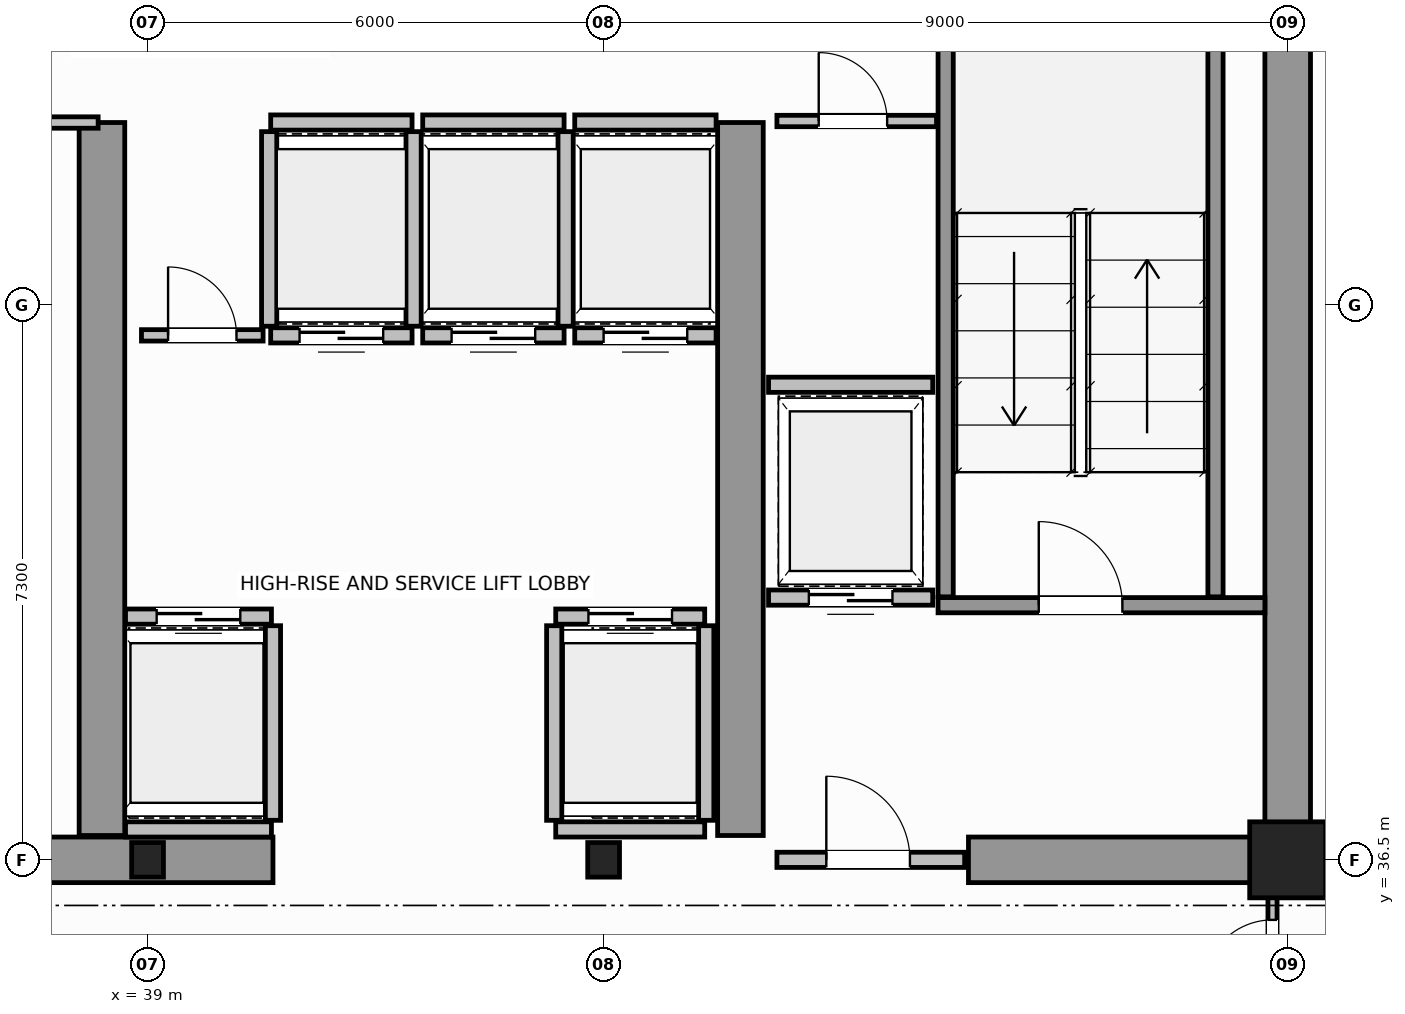
"""IFC4 building model, lengths in metres.
Left out: names, types, materials, properties, quantities, classifications, styles, units other than length and angle.
Written with IfcOpenShell. Run it as: python <this file> out.ifc"""

import sys

from ifc_helpers import new_model, si_unit, direction, frame, frame_2d, origin, origin_2d, place, context, subcontext, project, spatial, rectangle, i_section, extrude, source, transform, mapped, element, fill, save


model = new_model("IFC4")
c1 = context("Model", 3, precision=1e-05, world=origin(), true_north=direction((0.0, 1.0)))
c2 = subcontext(c1, "Body", "Model", "MODEL_VIEW")
j1 = project(units=[si_unit("LENGTHUNIT", "METRE"), si_unit("PLANEANGLEUNIT", "RADIAN")], contexts=[c1])
p1 = place(None, origin())
s1 = spatial("IfcSite", under=j1, at=p1, CompositionType="ELEMENT")
p2 = place(p1, origin())
s2 = spatial("IfcBuilding", under=s1, at=p2, CompositionType="ELEMENT")
p3 = place(p2, frame((0.0, 0.0, 210.8)))
s3 = spatial("IfcBuildingStorey", under=s2, at=p3, CompositionType="ELEMENT", Elevation=210.8)
m1 = source(origin(), c2, "Body", "SweptSolid", [
    extrude(i_section(OverallWidth=0.418, OverallDepth=0.455, WebThickness=0.042, FlangeThickness=0.058, FilletRadius=0.015, at=origin_2d()), origin(), (0.0, 0.0, 1.0), 3.8),
])
for number, where, z_axis, x_axis in (
    (1, (39.0, 36.5, 0.0), (0.0, 0.0, 1.0), (1.0, 0.0, 0.0)),
    (2, (45.0, 36.5, 0.0), (0.0, 0.0, 1.0), (1.0, 0.0, 0.0)),
):
    element("IfcColumn", number, at=place(p3, frame(where, z_axis=z_axis, x_axis=x_axis)), inside=s3, PredefinedType="COLUMN", context=c2, shape_type="MappedRepresentation", body=[
        mapped(m1, transform((0.0, 0.0, 0.0), scale=1.0)),
    ])
m2 = source(origin(), c2, "Body", "SweptSolid", [
    extrude(rectangle(XDim=1.0, YDim=1.0, at=origin_2d()), origin(), (0.0, 0.0, 1.0), 3.8),
])
p4 = place(p3, frame((54.0, 36.5, 0.0), z_axis=(0.0, 0.0, 1.0), x_axis=(1.0, 0.0, 0.0)))
e3 = element("IfcColumn", 3, at=p4, inside=s3, PredefinedType="COLUMN", context=c2, shape_type="MappedRepresentation", body=[
    mapped(m2, transform((0.0, 0.0, 0.0), scale=1.0)),
])
p5 = place(p3, frame((54.0, 36.5, 0.0), z_axis=(0.0, 0.0, 1.0), x_axis=(0.0, 1.0, 0.0)))
e4 = element("IfcWall", 4, at=p5, inside=s3, PredefinedType="SHEAR", context=c2, shape_type="SweptSolid", body=[
    extrude(rectangle(XDim=14.5, YDim=0.6, at=frame_2d((7.25, 0.0))), origin(), (0.0, 0.0, 1.0), 3.8),
])
p6 = place(p3, frame((36.15, 36.5, 0.0), z_axis=(0.0, 0.0, 1.0), x_axis=(1.0, 0.0, 0.0)))
e5 = element("IfcWall", 5, at=p6, inside=s3, PredefinedType="SHEAR", context=c2, shape_type="SweptSolid", body=[
    extrude(rectangle(XDim=4.5, YDim=0.6, at=frame_2d((2.25, 0.0))), origin(), (0.0, 0.0, 1.0), 3.8),
])
p7 = place(p3, frame((49.8, 36.5, 0.0), z_axis=(0.0, 0.0, 1.0), x_axis=(1.0, 0.0, 0.0)))
e6 = element("IfcWall", 6, at=p7, inside=s3, PredefinedType="SHEAR", context=c2, shape_type="SweptSolid", body=[
    extrude(rectangle(XDim=3.88, YDim=0.6, at=frame_2d((1.94, 0.0))), origin(), (0.0, 0.0, 1.0), 2.58),
])
for number, where, z_axis, x_axis in (
    (7, (38.4, 36.82, 0.0), (0.0, 0.0, 1.0), (0.0, 1.0, 0.0)),
    (8, (46.8, 36.82, 0.0), (0.0, 0.0, 1.0), (0.0, 1.0, 0.0)),
):
    element("IfcWall", number, at=place(p3, frame(where, z_axis=z_axis, x_axis=x_axis)), inside=s3, PredefinedType="SHEAR", context=c2, shape_type="SweptSolid", body=[
        extrude(rectangle(XDim=9.38, YDim=0.6, at=frame_2d((4.69, 0.0))), origin(), (0.0, 0.0, 1.0), 3.8),
    ])
p8 = place(p3, frame((49.4, 39.85, 0.0), z_axis=(0.0, 0.0, 1.0), x_axis=(1.0, 0.0, 0.0)))
e9 = element("IfcWall", 9, at=p8, inside=s3, PredefinedType="SOLIDWALL", context=c2, shape_type="SweptSolid", body=[
    extrude(rectangle(XDim=4.3, YDim=0.2, at=frame_2d((2.15, 0.0))), origin(), (0.0, 0.0, 1.0), 3.8),
])
p9 = place(p8, frame((1.325, 0.0, 0.0)))
e10 = element("IfcOpeningElement", 10, at=p9, cuts=e9, PredefinedType="OPENING", context=c2, shape_type="SweptSolid", body=[
    extrude(rectangle(XDim=1.1, YDim=2.15, at=frame_2d((0.55, 1.075))), frame((0.0, 0.11, 0.0), z_axis=(0.0, -1.0, 0.0), x_axis=(1.0, 0.0, 0.0)), (0.0, 0.0, 1.0), 0.22),
])
for number, where, z_axis, x_axis in (
    (11, (49.5, 39.96, 0.0), (0.0, 0.0, 1.0), (0.0, 1.0, 0.0)),
    (12, (53.05, 39.96, 0.0), (0.0, 0.0, 1.0), (0.0, 1.0, 0.0)),
):
    element("IfcWall", number, at=place(p3, frame(where, z_axis=z_axis, x_axis=x_axis)), inside=s3, PredefinedType="SOLIDWALL", context=c2, shape_type="SweptSolid", body=[
        extrude(rectangle(XDim=9.93, YDim=0.2, at=frame_2d((4.965, 0.0))), origin(), (0.0, 0.0, 1.0), 3.8),
    ])
p10 = place(p3, frame((47.28, 36.5, 0.0), z_axis=(0.0, 0.0, 1.0), x_axis=(1.0, 0.0, 0.0)))
e13 = element("IfcWall", 13, at=p10, inside=s3, PredefinedType="SOLIDWALL", context=c2, shape_type="SweptSolid", body=[
    extrude(rectangle(XDim=2.47, YDim=0.2, at=frame_2d((1.235, 0.0))), origin(), (0.0, 0.0, 1.0), 2.57),
])
p11 = place(p10, frame((0.65, 0.0, 0.0)))
e14 = element("IfcOpeningElement", 14, at=p11, cuts=e13, PredefinedType="OPENING", context=c2, shape_type="SweptSolid", body=[
    extrude(rectangle(XDim=1.1, YDim=2.15, at=frame_2d((0.55, 1.075))), frame((0.0, 0.11, 0.0), z_axis=(0.0, -1.0, 0.0), x_axis=(1.0, 0.0, 0.0)), (0.0, 0.0, 1.0), 0.22),
])
p12 = place(p3, frame((38.71, 39.7, 0.0), z_axis=(0.0, 0.0, 1.0), x_axis=(1.0, 0.0, 0.0)))
e15 = element("IfcWall", 15, at=p12, inside=s3, PredefinedType="SOLIDWALL", context=c2, shape_type="SweptSolid", body=[
    extrude(rectangle(XDim=1.92, YDim=0.2, at=frame_2d((0.96, 0.0))), origin(), (0.0, 0.0, 1.0), 3.58),
])
p13 = place(p12, frame((0.41, 0.0, 0.0)))
e16 = element("IfcOpeningElement", 16, at=p13, cuts=e15, PredefinedType="OPENING", context=c2, shape_type="SweptSolid", body=[
    extrude(rectangle(XDim=1.1, YDim=2.15, at=frame_2d((0.55, 1.075))), frame((0.0, 0.11, 0.0), z_axis=(0.0, -1.0, 0.0), x_axis=(1.0, 0.0, 0.0)), (0.0, 0.0, 1.0), 0.22),
])
p14 = place(p3, frame((38.71, 36.9, 0.0), z_axis=(0.0, 0.0, 1.0), x_axis=(1.0, 0.0, 0.0)))
e17 = element("IfcWall", 17, at=p14, inside=s3, PredefinedType="SOLIDWALL", context=c2, shape_type="SweptSolid", body=[
    extrude(rectangle(XDim=1.92, YDim=0.2, at=frame_2d((0.96, 0.0))), origin(), (0.0, 0.0, 1.0), 3.58),
])
p15 = place(p3, frame((40.65, 37.02, 0.0), z_axis=(0.0, 0.0, 1.0), x_axis=(0.0, 1.0, 0.0)))
e18 = element("IfcWall", 18, at=p15, inside=s3, PredefinedType="SOLIDWALL", context=c2, shape_type="SweptSolid", body=[
    extrude(rectangle(XDim=2.56, YDim=0.2, at=frame_2d((1.28, 0.0))), origin(), (0.0, 0.0, 1.0), 3.58),
])
p16 = place(p3, frame((44.37, 39.7, 0.0), z_axis=(0.0, 0.0, 1.0), x_axis=(1.0, 0.0, 0.0)))
e19 = element("IfcWall", 19, at=p16, inside=s3, PredefinedType="SOLIDWALL", context=c2, shape_type="SweptSolid", body=[
    extrude(rectangle(XDim=1.96, YDim=0.2, at=frame_2d((0.98, 0.0))), origin(), (0.0, 0.0, 1.0), 3.58),
])
p17 = place(p16, frame((0.43, 0.0, 0.0)))
e20 = element("IfcOpeningElement", 20, at=p17, cuts=e19, PredefinedType="OPENING", context=c2, shape_type="SweptSolid", body=[
    extrude(rectangle(XDim=1.1, YDim=2.15, at=frame_2d((0.55, 1.075))), frame((0.0, 0.11, 0.0), z_axis=(0.0, -1.0, 0.0), x_axis=(1.0, 0.0, 0.0)), (0.0, 0.0, 1.0), 0.22),
])
p18 = place(p3, frame((44.37, 36.9, 0.0), z_axis=(0.0, 0.0, 1.0), x_axis=(1.0, 0.0, 0.0)))
e21 = element("IfcWall", 21, at=p18, inside=s3, PredefinedType="SOLIDWALL", context=c2, shape_type="SweptSolid", body=[
    extrude(rectangle(XDim=1.96, YDim=0.2, at=frame_2d((0.98, 0.0))), origin(), (0.0, 0.0, 1.0), 2.57),
])
for number, where, z_axis, x_axis in (
    (22, (44.35, 37.02, 0.0), (0.0, 0.0, 1.0), (0.0, 1.0, 0.0)),
    (23, (46.35, 37.02, 0.0), (0.0, 0.0, 1.0), (0.0, 1.0, 0.0)),
):
    element("IfcWall", number, at=place(p3, frame(where, z_axis=z_axis, x_axis=x_axis)), inside=s3, PredefinedType="SOLIDWALL", context=c2, shape_type="SweptSolid", body=[
        extrude(rectangle(XDim=2.56, YDim=0.2, at=frame_2d((1.28, 0.0))), origin(), (0.0, 0.0, 1.0), 3.58),
    ])
p19 = place(p3, frame((40.62, 43.4, 0.0), z_axis=(0.0, 0.0, 1.0), x_axis=(1.0, 0.0, 0.0)))
e24 = element("IfcWall", 24, at=p19, inside=s3, PredefinedType="SOLIDWALL", context=c2, shape_type="SweptSolid", body=[
    extrude(rectangle(XDim=1.86, YDim=0.2, at=frame_2d((0.93, 0.0))), origin(), (0.0, 0.0, 1.0), 3.58),
])
p20 = place(p19, frame((0.38, 0.0, 0.0)))
e25 = element("IfcOpeningElement", 25, at=p20, cuts=e24, PredefinedType="OPENING", context=c2, shape_type="SweptSolid", body=[
    extrude(rectangle(XDim=1.1, YDim=2.15, at=frame_2d((0.55, 1.075))), frame((0.0, 0.11, 0.0), z_axis=(0.0, -1.0, 0.0), x_axis=(1.0, 0.0, 0.0)), (0.0, 0.0, 1.0), 0.22),
])
p21 = place(p3, frame((40.62, 46.2, 0.0), z_axis=(0.0, 0.0, 1.0), x_axis=(1.0, 0.0, 0.0)))
e26 = element("IfcWall", 26, at=p21, inside=s3, PredefinedType="SOLIDWALL", context=c2, shape_type="SweptSolid", body=[
    extrude(rectangle(XDim=1.86, YDim=0.2, at=frame_2d((0.93, 0.0))), origin(), (0.0, 0.0, 1.0), 3.58),
])
for number, where, z_axis, x_axis in (
    (27, (40.6, 43.52, 0.0), (0.0, 0.0, 1.0), (0.0, 1.0, 0.0)),
    (28, (42.5, 43.52, 0.0), (0.0, 0.0, 1.0), (0.0, 1.0, 0.0)),
):
    element("IfcWall", number, at=place(p3, frame(where, z_axis=z_axis, x_axis=x_axis)), inside=s3, PredefinedType="SOLIDWALL", context=c2, shape_type="SweptSolid", body=[
        extrude(rectangle(XDim=2.56, YDim=0.2, at=frame_2d((1.28, 0.0))), origin(), (0.0, 0.0, 1.0), 3.58),
    ])
p22 = place(p3, frame((42.62, 43.4, 0.0), z_axis=(0.0, 0.0, 1.0), x_axis=(1.0, 0.0, 0.0)))
e29 = element("IfcWall", 29, at=p22, inside=s3, PredefinedType="SOLIDWALL", context=c2, shape_type="SweptSolid", body=[
    extrude(rectangle(XDim=1.86, YDim=0.2, at=frame_2d((0.93, 0.0))), origin(), (0.0, 0.0, 1.0), 3.58),
])
p23 = place(p22, frame((0.38, 0.0, 0.0)))
e30 = element("IfcOpeningElement", 30, at=p23, cuts=e29, PredefinedType="OPENING", context=c2, shape_type="SweptSolid", body=[
    extrude(rectangle(XDim=1.1, YDim=2.15, at=frame_2d((0.55, 1.075))), frame((0.0, 0.11, 0.0), z_axis=(0.0, -1.0, 0.0), x_axis=(1.0, 0.0, 0.0)), (0.0, 0.0, 1.0), 0.22),
])
p24 = place(p3, frame((42.62, 46.2, 0.0), z_axis=(0.0, 0.0, 1.0), x_axis=(1.0, 0.0, 0.0)))
e31 = element("IfcWall", 31, at=p24, inside=s3, PredefinedType="SOLIDWALL", context=c2, shape_type="SweptSolid", body=[
    extrude(rectangle(XDim=1.86, YDim=0.2, at=frame_2d((0.93, 0.0))), origin(), (0.0, 0.0, 1.0), 3.58),
])
p25 = place(p3, frame((44.5, 43.52, 0.0), z_axis=(0.0, 0.0, 1.0), x_axis=(0.0, 1.0, 0.0)))
e32 = element("IfcWall", 32, at=p25, inside=s3, PredefinedType="SOLIDWALL", context=c2, shape_type="SweptSolid", body=[
    extrude(rectangle(XDim=2.56, YDim=0.2, at=frame_2d((1.28, 0.0))), origin(), (0.0, 0.0, 1.0), 3.58),
])
p26 = place(p3, frame((44.62, 43.4, 0.0), z_axis=(0.0, 0.0, 1.0), x_axis=(1.0, 0.0, 0.0)))
e33 = element("IfcWall", 33, at=p26, inside=s3, PredefinedType="SOLIDWALL", context=c2, shape_type="SweptSolid", body=[
    extrude(rectangle(XDim=1.86, YDim=0.2, at=frame_2d((0.93, 0.0))), origin(), (0.0, 0.0, 1.0), 3.58),
])
p27 = place(p26, frame((0.38, 0.0, 0.0)))
e34 = element("IfcOpeningElement", 34, at=p27, cuts=e33, PredefinedType="OPENING", context=c2, shape_type="SweptSolid", body=[
    extrude(rectangle(XDim=1.1, YDim=2.15, at=frame_2d((0.55, 1.075))), frame((0.0, 0.11, 0.0), z_axis=(0.0, -1.0, 0.0), x_axis=(1.0, 0.0, 0.0)), (0.0, 0.0, 1.0), 0.22),
])
p28 = place(p3, frame((44.62, 46.2, 0.0), z_axis=(0.0, 0.0, 1.0), x_axis=(1.0, 0.0, 0.0)))
e35 = element("IfcWall", 35, at=p28, inside=s3, PredefinedType="SOLIDWALL", context=c2, shape_type="SweptSolid", body=[
    extrude(rectangle(XDim=1.86, YDim=0.2, at=frame_2d((0.93, 0.0))), origin(), (0.0, 0.0, 1.0), 3.58),
])
p29 = place(p3, frame((47.17, 39.95, 0.0), z_axis=(0.0, 0.0, 1.0), x_axis=(1.0, 0.0, 0.0)))
e36 = element("IfcWall", 36, at=p29, inside=s3, PredefinedType="SOLIDWALL", context=c2, shape_type="SweptSolid", body=[
    extrude(rectangle(XDim=2.16, YDim=0.2, at=frame_2d((1.08, 0.0))), origin(), (0.0, 0.0, 1.0), 3.58),
])
p30 = place(p29, frame((0.53, 0.0, 0.0)))
e37 = element("IfcOpeningElement", 37, at=p30, cuts=e36, PredefinedType="OPENING", context=c2, shape_type="SweptSolid", body=[
    extrude(rectangle(XDim=1.1, YDim=2.15, at=frame_2d((0.55, 1.075))), frame((0.0, 0.11, 0.0), z_axis=(0.0, -1.0, 0.0), x_axis=(1.0, 0.0, 0.0)), (0.0, 0.0, 1.0), 0.22),
])
p31 = place(p3, frame((47.17, 42.75, 0.0), z_axis=(0.0, 0.0, 1.0), x_axis=(1.0, 0.0, 0.0)))
e38 = element("IfcWall", 38, at=p31, inside=s3, PredefinedType="SOLIDWALL", context=c2, shape_type="SweptSolid", body=[
    extrude(rectangle(XDim=2.16, YDim=0.2, at=frame_2d((1.08, 0.0))), origin(), (0.0, 0.0, 1.0), 3.58),
])
p32 = place(p3, frame((29.85, 46.2, 0.0), z_axis=(0.0, 0.0, 1.0), x_axis=(1.0, 0.0, 0.0)))
e39 = element("IfcWall", 39, at=p32, inside=s3, PredefinedType="PARTITIONING", context=c2, shape_type="SweptSolid", body=[
    extrude(rectangle(XDim=8.5, YDim=0.15, at=frame_2d((4.25, 0.0))), origin(), (0.0, 0.0, 1.0), 3.58),
])
p33 = place(p3, frame((47.28, 46.22, 0.0), z_axis=(0.0, 0.0, 1.0), x_axis=(1.0, 0.0, 0.0)))
e40 = element("IfcWall", 40, at=p33, inside=s3, PredefinedType="PARTITIONING", context=c2, shape_type="SweptSolid", body=[
    extrude(rectangle(XDim=2.1, YDim=0.15, at=frame_2d((1.05, 0.0))), origin(), (0.0, 0.0, 1.0), 3.58),
])
p34 = place(p33, frame((0.55, 0.0, 0.0)))
e41 = element("IfcOpeningElement", 41, at=p34, cuts=e40, PredefinedType="OPENING", context=c2, shape_type="SweptSolid", body=[
    extrude(rectangle(XDim=0.9, YDim=2.1, at=frame_2d((0.45, 1.05))), frame((0.0, 0.085, 0.0), z_axis=(0.0, -1.0, 0.0), x_axis=(1.0, 0.0, 0.0)), (0.0, 0.0, 1.0), 0.17),
])
p35 = place(p3, frame((38.92, 43.4, 0.0), z_axis=(0.0, 0.0, 1.0), x_axis=(1.0, 0.0, 0.0)))
e42 = element("IfcWall", 42, at=p35, inside=s3, PredefinedType="PARTITIONING", context=c2, shape_type="SweptSolid", body=[
    extrude(rectangle(XDim=1.6, YDim=0.15, at=frame_2d((0.8, 0.0))), origin(), (0.0, 0.0, 1.0), 3.58),
])
p36 = place(p35, frame((0.35, 0.0, 0.0)))
e43 = element("IfcOpeningElement", 43, at=p36, cuts=e42, PredefinedType="OPENING", context=c2, shape_type="SweptSolid", body=[
    extrude(rectangle(XDim=0.9, YDim=2.1, at=frame_2d((0.45, 1.05))), frame((0.0, 0.085, 0.0), z_axis=(0.0, -1.0, 0.0), x_axis=(1.0, 0.0, 0.0)), (0.0, 0.0, 1.0), 0.17),
])
p37 = place(p3, frame((53.8, 34.16, 0.0), z_axis=(0.0, 0.0, 1.0), x_axis=(0.0, 1.0, 0.0)))
e44 = element("IfcWall", 44, at=p37, inside=s3, PredefinedType="PARTITIONING", context=c2, shape_type="SweptSolid", body=[
    extrude(rectangle(XDim=2.28, YDim=0.12, at=frame_2d((1.14, 0.0))), origin(), (0.0, 0.0, 1.0), 3.58),
])
p38 = place(p37, frame((0.65, 0.0, 0.0)))
e45 = element("IfcOpeningElement", 45, at=p38, cuts=e44, PredefinedType="OPENING", context=c2, shape_type="SweptSolid", body=[
    extrude(rectangle(XDim=0.9, YDim=2.15, at=frame_2d((0.45, 1.075))), frame((0.0, 0.07, 0.0), z_axis=(0.0, -1.0, 0.0), x_axis=(1.0, 0.0, 0.0)), (0.0, 0.0, 1.0), 0.14),
])
m3 = source(origin(), c2, "Body", "SweptSolid", [
    extrude(rectangle(XDim=1.1, YDim=2.15, at=frame_2d((0.55, 1.075))), frame((0.0, 0.025, 0.0), z_axis=(0.0, -1.0, 0.0), x_axis=(1.0, 0.0, 0.0)), (0.0, 0.0, 1.0), 0.05),
])
p39 = place(p9, origin())
e46 = element("IfcDoor", 46, at=p39, inside=s3, OperationType="SINGLE_SWING_RIGHT", PredefinedType="DOOR", context=c2, shape_type="MappedRepresentation", body=[
    mapped(m3, transform((0.0, 0.0, 0.0), scale=1.0)),
])
fill(e10, e46)
p40 = place(p11, origin())
e47 = element("IfcDoor", 47, at=p40, inside=s3, OperationType="SINGLE_SWING_LEFT", PredefinedType="DOOR", context=c2, shape_type="MappedRepresentation", body=[
    mapped(m3, transform((0.0, 0.0, 0.0), scale=1.0)),
])
fill(e14, e47)
p41 = place(p13, origin())
e48 = element("IfcDoor", 48, at=p41, inside=s3, OperationType="DOUBLE_DOOR_SLIDING", PredefinedType="DOOR", context=c2, shape_type="MappedRepresentation", body=[
    mapped(m3, transform((0.0, 0.0, 0.0), scale=1.0)),
])
fill(e16, e48)
p42 = place(p17, origin())
e49 = element("IfcDoor", 49, at=p42, inside=s3, OperationType="DOUBLE_DOOR_SLIDING", PredefinedType="DOOR", context=c2, shape_type="MappedRepresentation", body=[
    mapped(m3, transform((0.0, 0.0, 0.0), scale=1.0)),
])
fill(e20, e49)
p43 = place(p20, origin())
e50 = element("IfcDoor", 50, at=p43, inside=s3, OperationType="DOUBLE_DOOR_SLIDING", PredefinedType="DOOR", context=c2, shape_type="MappedRepresentation", body=[
    mapped(m3, transform((0.0, 0.0, 0.0), scale=1.0)),
])
fill(e25, e50)
p44 = place(p23, origin())
e51 = element("IfcDoor", 51, at=p44, inside=s3, OperationType="DOUBLE_DOOR_SLIDING", PredefinedType="DOOR", context=c2, shape_type="MappedRepresentation", body=[
    mapped(m3, transform((0.0, 0.0, 0.0), scale=1.0)),
])
fill(e30, e51)
p45 = place(p27, origin())
e52 = element("IfcDoor", 52, at=p45, inside=s3, OperationType="DOUBLE_DOOR_SLIDING", PredefinedType="DOOR", context=c2, shape_type="MappedRepresentation", body=[
    mapped(m3, transform((0.0, 0.0, 0.0), scale=1.0)),
])
fill(e34, e52)
p46 = place(p30, origin())
e53 = element("IfcDoor", 53, at=p46, inside=s3, OperationType="DOUBLE_DOOR_SLIDING", PredefinedType="DOOR", context=c2, shape_type="MappedRepresentation", body=[
    mapped(m3, transform((0.0, 0.0, 0.0), scale=1.0)),
])
fill(e37, e53)
m4 = source(origin(), c2, "Body", "SweptSolid", [
    extrude(rectangle(XDim=0.9, YDim=2.1, at=frame_2d((0.45, 1.05))), frame((0.0, 0.025, 0.0), z_axis=(0.0, -1.0, 0.0), x_axis=(1.0, 0.0, 0.0)), (0.0, 0.0, 1.0), 0.05),
])
p47 = place(p34, origin())
e54 = element("IfcDoor", 54, at=p47, inside=s3, OperationType="SINGLE_SWING_RIGHT", PredefinedType="DOOR", context=c2, shape_type="MappedRepresentation", body=[
    mapped(m4, transform((0.0, 0.0, 0.0), scale=1.0)),
])
fill(e41, e54)
p48 = place(p36, origin())
e55 = element("IfcDoor", 55, at=p48, inside=s3, OperationType="SINGLE_SWING_LEFT", PredefinedType="DOOR", context=c2, shape_type="MappedRepresentation", body=[
    mapped(m4, transform((0.0, 0.0, 0.0), scale=1.0)),
])
fill(e43, e55)
m5 = source(origin(), c2, "Body", "SweptSolid", [
    extrude(rectangle(XDim=0.9, YDim=2.15, at=frame_2d((0.45, 1.075))), frame((0.0, 0.025, 0.0), z_axis=(0.0, -1.0, 0.0), x_axis=(1.0, 0.0, 0.0)), (0.0, 0.0, 1.0), 0.05),
])
p49 = place(p38, origin())
e56 = element("IfcDoor", 56, at=p49, inside=s3, OperationType="SINGLE_SWING_RIGHT", PredefinedType="DOOR", context=c2, shape_type="MappedRepresentation", body=[
    mapped(m5, transform((0.0, 0.0, 0.0), scale=1.0)),
])
fill(e45, e56)
save(model, sys.argv[1])
